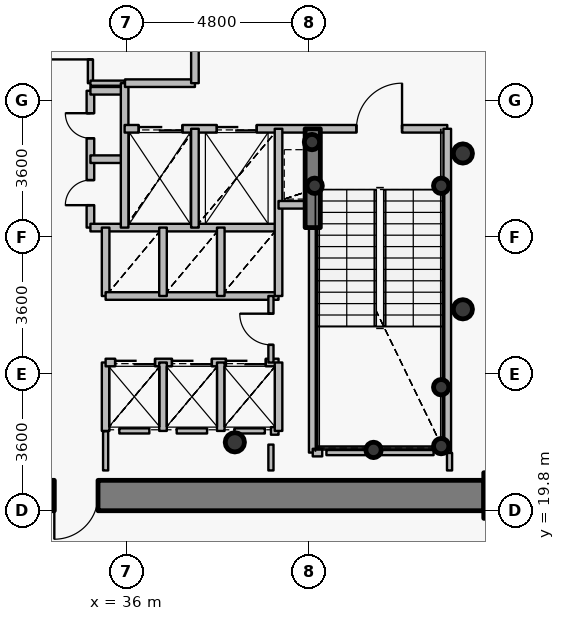
"""IFC4 building model, lengths in metres.
Left out: names, types, materials, properties, quantities, classifications, styles, units other than length and angle.
Written with IfcOpenShell. Run it as: python <this file> out.ifc"""

import sys

from ifc_helpers import new_model, si_unit, direction, frame, frame_2d, origin, origin_2d, place, context, subcontext, project, spatial, rectangle, hollow_circle, extrude, source, transform, mapped, element, fill, save


model = new_model("IFC4")
c1 = context("Model", 3, precision=1e-05, world=origin(), true_north=direction((0.0, 1.0)))
c2 = subcontext(c1, "Body", "Model", "MODEL_VIEW")
j1 = project(units=[si_unit("LENGTHUNIT", "METRE"), si_unit("PLANEANGLEUNIT", "RADIAN")], contexts=[c1])
p1 = place(None, origin())
s1 = spatial("IfcSite", under=j1, at=p1, CompositionType="ELEMENT")
p2 = place(p1, origin())
s2 = spatial("IfcBuilding", under=s1, at=p2, CompositionType="ELEMENT")
p3 = place(p2, frame((0.0, 0.0, 97.2)))
s3 = spatial("IfcBuildingStorey", under=s2, at=p3, CompositionType="ELEMENT", Elevation=97.2)
p4 = place(p3, frame((46.0, 20.2, 0.0), z_axis=(0.0, 0.0, 1.0), x_axis=(1.0, 0.0, 0.0)))
e1 = element("IfcColumn", 1, at=p4, inside=s3, PredefinedType="COLUMN", context=c2, shape_type="SweptSolid", body=[
    extrude(rectangle(XDim=1.2, YDim=1.2, at=origin_2d()), origin(), (0.0, 0.0, 1.0), 3.75),
])
p5 = place(p3, frame((38.85, 21.6, 0.0), z_axis=(0.0, 0.0, 1.0), x_axis=(1.0, 0.0, 0.0)))
e2 = element("IfcColumn", 2, at=p5, inside=s3, PredefinedType="COLUMN", context=c2, shape_type="SweptSolid", body=[
    extrude(hollow_circle(Radius=0.254, WallThickness=0.02, at=origin_2d()), origin(), (0.0, 0.0, 1.0), 3.75),
])
for number, where, z_axis, x_axis in (
    (3, (44.28, 21.5, 0.0), (0.0, 0.0, 1.0), (1.0, 0.0, 0.0)),
    (4, (44.28, 23.05, 0.0), (0.0, 0.0, 1.0), (1.0, 0.0, 0.0)),
    (5, (42.5, 21.4, 0.0), (0.0, 0.0, 1.0), (1.0, 0.0, 0.0)),
    (6, (40.95, 28.35, 0.0), (0.0, 0.0, 1.0), (1.0, 0.0, 0.0)),
    (7, (44.28, 28.35, 0.0), (0.0, 0.0, 1.0), (1.0, 0.0, 0.0)),
    (8, (40.88, 29.5, 0.0), (0.0, 0.0, 1.0), (1.0, 0.0, 0.0)),
):
    element("IfcColumn", number, at=place(p3, frame(where, z_axis=z_axis, x_axis=x_axis)), inside=s3, PredefinedType="COLUMN", context=c2, shape_type="SweptSolid", body=[
        extrude(hollow_circle(Radius=0.203, WallThickness=0.016, at=origin_2d()), origin(), (0.0, 0.0, 1.0), 3.75),
    ])
p6 = place(p3, frame((45.4, 20.2, 0.0), z_axis=(0.0, 0.0, 1.0), x_axis=(-1.0, 0.0, 0.0)))
e9 = element("IfcWall", 9, at=p6, inside=s3, PredefinedType="SHEAR", context=c2, shape_type="SweptSolid", body=[
    extrude(rectangle(XDim=18.8, YDim=0.8, at=frame_2d((9.4, 0.0))), origin(), (0.0, 0.0, 1.0), 2.95),
])
p7 = place(p6, frame((10.15, 0.0, 0.0)))
e10 = element("IfcOpeningElement", 10, at=p7, cuts=e9, PredefinedType="OPENING", context=c2, shape_type="SweptSolid", body=[
    extrude(rectangle(XDim=1.15, YDim=2.15, at=origin_2d()), frame((0.575, 0.41, 1.075), z_axis=(0.0, -1.0, 0.0), x_axis=(1.0, 0.0, 0.0)), (0.0, 0.0, 1.0), 0.82),
])
p8 = place(p3, frame((40.9, 27.25, 0.0), z_axis=(0.0, 0.0, 1.0), x_axis=(0.0, 1.0, 0.0)))
e11 = element("IfcWall", 11, at=p8, inside=s3, PredefinedType="SHEAR", context=c2, shape_type="SweptSolid", body=[
    extrude(rectangle(XDim=2.6, YDim=0.4, at=frame_2d((1.3, 0.0))), origin(), (0.0, 0.0, 1.0), 3.1),
])
for number, where, z_axis, x_axis in (
    (12, (44.85, 25.1, 0.0), (0.0, 0.0, 1.0), (1.0, 0.0, 0.0)),
    (13, (44.85, 29.2, 0.0), (0.0, 0.0, 1.0), (1.0, 0.0, 0.0)),
):
    element("IfcColumn", number, at=place(p3, frame(where, z_axis=z_axis, x_axis=x_axis)), inside=s3, PredefinedType="COLUMN", context=c2, shape_type="SweptSolid", body=[
        extrude(hollow_circle(Radius=0.254, WallThickness=0.02, at=origin_2d()), origin(), (0.0, 0.0, 1.0), 3.75),
    ])
p9 = place(p3, frame((35.05, 27.25, 0.0), z_axis=(0.0, 0.0, 1.0), x_axis=(0.0, 1.0, 0.0)))
e14 = element("IfcWall", 14, at=p9, inside=s3, PredefinedType="PARTITIONING", context=c2, shape_type="SweptSolid", body=[
    extrude(rectangle(XDim=3.6, YDim=0.2, at=frame_2d((1.8, 0.0))), origin(), (0.0, 0.0, 1.0), 3.5),
])
p10 = place(p9, frame((0.59, 0.0, 0.0)))
e15 = element("IfcOpeningElement", 15, at=p10, cuts=e14, PredefinedType="OPENING", context=c2, shape_type="SweptSolid", body=[
    extrude(rectangle(XDim=0.66, YDim=2.05, at=origin_2d()), frame((0.33, 0.11, 1.025), z_axis=(0.0, -1.0, 0.0), x_axis=(1.0, 0.0, 0.0)), (0.0, 0.0, 1.0), 0.22),
])
p11 = place(p9, frame((2.35, 0.0, 0.0)))
e16 = element("IfcOpeningElement", 16, at=p11, cuts=e14, PredefinedType="OPENING", context=c2, shape_type="SweptSolid", body=[
    extrude(rectangle(XDim=0.66, YDim=2.05, at=origin_2d()), frame((0.33, 0.11, 1.025), z_axis=(0.0, -1.0, 0.0), x_axis=(1.0, 0.0, 0.0)), (0.0, 0.0, 1.0), 0.22),
])
p12 = place(p3, frame((35.05, 27.25, 0.0), z_axis=(0.0, 0.0, 1.0), x_axis=(1.0, 0.0, 0.0)))
e17 = element("IfcWall", 17, at=p12, inside=s3, PredefinedType="PARTITIONING", context=c2, shape_type="SweptSolid", body=[
    extrude(rectangle(XDim=4.95, YDim=0.2, at=frame_2d((2.475, 0.0))), origin(), (0.0, 0.0, 1.0), 3.085),
])
for number, where, z_axis, x_axis in (
    (18, (35.05, 29.05, 0.0), (0.0, 0.0, 1.0), (1.0, 0.0, 0.0)),
    (19, (35.05, 30.85, 0.0), (0.0, 0.0, 1.0), (1.0, 0.0, 0.0)),
):
    element("IfcWall", number, at=place(p3, frame(where, z_axis=z_axis, x_axis=x_axis)), inside=s3, PredefinedType="PARTITIONING", context=c2, shape_type="SweptSolid", body=[
        extrude(rectangle(XDim=0.9, YDim=0.2, at=frame_2d((0.45, 0.0))), origin(), (0.0, 0.0, 1.0), 3.5),
    ])
p13 = place(p3, frame((35.05, 31.05, 0.0), z_axis=(0.0, 0.0, 1.0), x_axis=(0.0, 1.0, 0.0)))
e20 = element("IfcWall", 20, at=p13, inside=s3, PredefinedType="PARTITIONING", context=c2, shape_type="SweptSolid", body=[
    extrude(rectangle(XDim=2.35, YDim=0.135, at=frame_2d((1.175, 0.0))), origin(), (0.0, 0.0, 1.0), 3.085),
])
p14 = place(p13, frame((0.625, 0.0, 0.0)))
e21 = element("IfcOpeningElement", 21, at=p14, cuts=e20, PredefinedType="OPENING", context=c2, shape_type="SweptSolid", body=[
    extrude(rectangle(XDim=1.1, YDim=2.15, at=origin_2d()), frame((0.55, 0.078, 1.075), z_axis=(0.0, -1.0, 0.0), x_axis=(1.0, 0.0, 0.0)), (0.0, 0.0, 1.0), 0.155),
])
p15 = place(p3, frame((35.05, 31.05, 0.0), z_axis=(0.0, 0.0, 1.0), x_axis=(1.0, 0.0, 0.0)))
e22 = element("IfcWall", 22, at=p15, inside=s3, PredefinedType="PARTITIONING", context=c2, shape_type="SweptSolid", body=[
    extrude(rectangle(XDim=0.9, YDim=0.135, at=frame_2d((0.45, 0.0))), origin(), (0.0, 0.0, 1.0), 3.5),
])
p16 = place(p3, frame((35.45, 21.9, 0.0), z_axis=(0.0, 0.0, 1.0), x_axis=(0.0, 1.0, 0.0)))
e23 = element("IfcWall", 23, at=p16, inside=s3, PredefinedType="PARTITIONING", context=c2, shape_type="SweptSolid", body=[
    extrude(rectangle(XDim=1.8, YDim=0.2, at=frame_2d((0.9, 0.0))), origin(), (0.0, 0.0, 1.0), 3.5),
])
p17 = place(p3, frame((35.45, 23.7, 0.0), z_axis=(0.0, 0.0, 1.0), x_axis=(1.0, 0.0, 0.0)))
e24 = element("IfcWall", 24, at=p17, inside=s3, PredefinedType="PARTITIONING", context=c2, shape_type="SweptSolid", body=[
    extrude(rectangle(XDim=4.55, YDim=0.2, at=frame_2d((2.275, 0.0))), origin(), (0.0, 0.0, 1.0), 3.085),
])
p18 = place(p17, frame((0.25, 0.0, 0.0)))
e25 = element("IfcOpeningElement", 25, at=p18, cuts=e24, PredefinedType="OPENING", context=c2, shape_type="SweptSolid", body=[
    extrude(rectangle(XDim=1.05, YDim=2.15, at=origin_2d()), frame((0.525, 0.11, 1.075), z_axis=(0.0, -1.0, 0.0), x_axis=(1.0, 0.0, 0.0)), (0.0, 0.0, 1.0), 0.22),
])
p19 = place(p17, frame((1.745, 0.0, 0.0)))
e26 = element("IfcOpeningElement", 26, at=p19, cuts=e24, PredefinedType="OPENING", context=c2, shape_type="SweptSolid", body=[
    extrude(rectangle(XDim=1.05, YDim=2.15, at=origin_2d()), frame((0.525, 0.11, 1.075), z_axis=(0.0, -1.0, 0.0), x_axis=(1.0, 0.0, 0.0)), (0.0, 0.0, 1.0), 0.22),
])
p20 = place(p17, frame((3.165, 0.0, 0.0)))
e27 = element("IfcOpeningElement", 27, at=p20, cuts=e24, PredefinedType="OPENING", context=c2, shape_type="SweptSolid", body=[
    extrude(rectangle(XDim=1.05, YDim=2.15, at=origin_2d()), frame((0.525, 0.11, 1.075), z_axis=(0.0, -1.0, 0.0), x_axis=(1.0, 0.0, 0.0)), (0.0, 0.0, 1.0), 0.22),
])
p21 = place(p3, frame((35.45, 25.45, 0.0), z_axis=(0.0, 0.0, 1.0), x_axis=(0.0, 1.0, 0.0)))
e28 = element("IfcWall", 28, at=p21, inside=s3, PredefinedType="PARTITIONING", context=c2, shape_type="SweptSolid", body=[
    extrude(rectangle(XDim=1.8, YDim=0.2, at=frame_2d((0.9, 0.0))), origin(), (0.0, 0.0, 1.0), 3.5),
])
p22 = place(p3, frame((35.45, 25.45, 0.0), z_axis=(0.0, 0.0, 1.0), x_axis=(1.0, 0.0, 0.0)))
e29 = element("IfcWall", 29, at=p22, inside=s3, PredefinedType="PARTITIONING", context=c2, shape_type="SweptSolid", body=[
    extrude(rectangle(XDim=4.55, YDim=0.2, at=frame_2d((2.275, 0.0))), origin(), (0.0, 0.0, 1.0), 3.085),
])
p23 = place(p3, frame((35.95, 27.25, 0.0), z_axis=(0.0, 0.0, 1.0), x_axis=(0.0, 1.0, 0.0)))
e30 = element("IfcWall", 30, at=p23, inside=s3, PredefinedType="PARTITIONING", context=c2, shape_type="SweptSolid", body=[
    extrude(rectangle(XDim=3.8, YDim=0.2, at=frame_2d((1.9, 0.0))), origin(), (0.0, 0.0, 1.0), 3.5),
])
p24 = place(p3, frame((35.95, 29.85, 0.0), z_axis=(0.0, 0.0, 1.0), x_axis=(1.0, 0.0, 0.0)))
e31 = element("IfcWall", 31, at=p24, inside=s3, PredefinedType="PARTITIONING", context=c2, shape_type="SweptSolid", body=[
    extrude(rectangle(XDim=8.49, YDim=0.2, at=frame_2d((4.245, 0.0))), origin(), (0.0, 0.0, 1.0), 3.085),
])
p25 = place(p24, frame((6.1, 0.0, 0.0)))
e32 = element("IfcOpeningElement", 32, at=p25, cuts=e31, PredefinedType="OPENING", context=c2, shape_type="SweptSolid", body=[
    extrude(rectangle(XDim=1.2, YDim=2.15, at=origin_2d()), frame((0.6, 0.11, 1.075), z_axis=(0.0, -1.0, 0.0), x_axis=(1.0, 0.0, 0.0)), (0.0, 0.0, 1.0), 0.22),
])
p26 = place(p24, frame((0.37, 0.0, 0.0)))
e33 = element("IfcOpeningElement", 33, at=p26, cuts=e31, PredefinedType="OPENING", context=c2, shape_type="SweptSolid", body=[
    extrude(rectangle(XDim=1.15, YDim=2.15, at=origin_2d()), frame((0.575, 0.11, 1.075), z_axis=(0.0, -1.0, 0.0), x_axis=(1.0, 0.0, 0.0)), (0.0, 0.0, 1.0), 0.22),
])
p27 = place(p24, frame((2.425, 0.0, 0.0)))
e34 = element("IfcOpeningElement", 34, at=p27, cuts=e31, PredefinedType="OPENING", context=c2, shape_type="SweptSolid", body=[
    extrude(rectangle(XDim=1.05, YDim=2.15, at=origin_2d()), frame((0.525, 0.11, 1.075), z_axis=(0.0, -1.0, 0.0), x_axis=(1.0, 0.0, 0.0)), (0.0, 0.0, 1.0), 0.22),
])
p28 = place(p3, frame((35.96, 31.05, 0.0), z_axis=(0.0, 0.0, 1.0), x_axis=(1.0, 0.0, 0.0)))
e35 = element("IfcWall", 35, at=p28, inside=s3, PredefinedType="PARTITIONING", context=c2, shape_type="SweptSolid", body=[
    extrude(rectangle(XDim=1.84, YDim=0.2, at=frame_2d((0.92, 0.0))), origin(), (0.0, 0.0, 1.0), 3.5),
])
for number, where, z_axis, x_axis in (
    (36, (36.96, 21.9, 0.0), (0.0, 0.0, 1.0), (0.0, 1.0, 0.0)),
    (37, (36.96, 25.45, 0.0), (0.0, 0.0, 1.0), (0.0, 1.0, 0.0)),
):
    element("IfcWall", number, at=place(p3, frame(where, z_axis=z_axis, x_axis=x_axis)), inside=s3, PredefinedType="PARTITIONING", context=c2, shape_type="SweptSolid", body=[
        extrude(rectangle(XDim=1.8, YDim=0.2, at=frame_2d((0.9, 0.0))), origin(), (0.0, 0.0, 1.0), 3.5),
    ])
p29 = place(p3, frame((37.8, 27.25, 0.0), z_axis=(0.0, 0.0, 1.0), x_axis=(0.0, 1.0, 0.0)))
e38 = element("IfcWall", 38, at=p29, inside=s3, PredefinedType="PARTITIONING", context=c2, shape_type="SweptSolid", body=[
    extrude(rectangle(XDim=2.6, YDim=0.2, at=frame_2d((1.3, 0.0))), origin(), (0.0, 0.0, 1.0), 3.5),
])
p30 = place(p3, frame((37.8, 31.05, 0.0), z_axis=(0.0, 0.0, 1.0), x_axis=(0.0, 1.0, 0.0)))
e39 = element("IfcWall", 39, at=p30, inside=s3, PredefinedType="PARTITIONING", context=c2, shape_type="SweptSolid", body=[
    extrude(rectangle(XDim=2.35, YDim=0.2, at=frame_2d((1.175, 0.0))), origin(), (0.0, 0.0, 1.0), 3.085),
])
for number, where, z_axis, x_axis in (
    (40, (38.48, 21.9, 0.0), (0.0, 0.0, 1.0), (0.0, 1.0, 0.0)),
    (41, (38.48, 25.45, 0.0), (0.0, 0.0, 1.0), (0.0, 1.0, 0.0)),
):
    element("IfcWall", number, at=place(p3, frame(where, z_axis=z_axis, x_axis=x_axis)), inside=s3, PredefinedType="PARTITIONING", context=c2, shape_type="SweptSolid", body=[
        extrude(rectangle(XDim=1.8, YDim=0.2, at=frame_2d((0.9, 0.0))), origin(), (0.0, 0.0, 1.0), 3.5),
    ])
p31 = place(p3, frame((39.8, 21.9, 0.0), z_axis=(0.0, 0.0, 1.0), x_axis=(1.0, 0.0, 0.0)))
e42 = element("IfcWall", 42, at=p31, inside=s3, PredefinedType="PARTITIONING", context=c2, shape_type="SweptSolid", body=[
    extrude(rectangle(XDim=0.2, YDim=0.2, at=frame_2d((0.1, 0.0))), origin(), (0.0, 0.0, 1.0), 3.5),
])
p32 = place(p3, frame((39.8, 23.7, 0.0), z_axis=(0.0, 0.0, 1.0), x_axis=(0.0, 1.0, 0.0)))
e43 = element("IfcWall", 43, at=p32, inside=s3, PredefinedType="PARTITIONING", context=c2, shape_type="SweptSolid", body=[
    extrude(rectangle(XDim=1.75, YDim=0.135, at=frame_2d((0.875, 0.0))), origin(), (0.0, 0.0, 1.0), 3.5),
])
p33 = place(p32, frame((0.465, 0.0, 0.0)))
e44 = element("IfcOpeningElement", 44, at=p33, cuts=e43, PredefinedType="OPENING", context=c2, shape_type="SweptSolid", body=[
    extrude(rectangle(XDim=0.82, YDim=2.1, at=origin_2d()), frame((0.41, 0.078, 1.05), z_axis=(0.0, -1.0, 0.0), x_axis=(1.0, 0.0, 0.0)), (0.0, 0.0, 1.0), 0.155),
])
p34 = place(p3, frame((40.0, 21.9, 0.0), z_axis=(0.0, 0.0, 1.0), x_axis=(0.0, 1.0, 0.0)))
e45 = element("IfcWall", 45, at=p34, inside=s3, PredefinedType="PARTITIONING", context=c2, shape_type="SweptSolid", body=[
    extrude(rectangle(XDim=1.8, YDim=0.2, at=frame_2d((0.9, 0.0))), origin(), (0.0, 0.0, 1.0), 3.5),
])
p35 = place(p3, frame((40.0, 25.45, 0.0), z_axis=(0.0, 0.0, 1.0), x_axis=(0.0, 1.0, 0.0)))
e46 = element("IfcWall", 46, at=p35, inside=s3, PredefinedType="PARTITIONING", context=c2, shape_type="SweptSolid", body=[
    extrude(rectangle(XDim=4.4, YDim=0.2, at=frame_2d((2.2, 0.0))), origin(), (0.0, 0.0, 1.0), 3.5),
])
p36 = place(p3, frame((40.0, 27.85, 0.0), z_axis=(0.0, 0.0, 1.0), x_axis=(1.0, 0.0, 0.0)))
e47 = element("IfcWall", 47, at=p36, inside=s3, PredefinedType="PARTITIONING", context=c2, shape_type="SweptSolid", body=[
    extrude(rectangle(XDim=0.9, YDim=0.2, at=frame_2d((0.45, 0.0))), origin(), (0.0, 0.0, 1.0), 3.5),
])
p37 = place(p3, frame((40.9, 21.33, 0.0), z_axis=(0.0, 0.0, 1.0), x_axis=(0.0, 1.0, 0.0)))
e48 = element("IfcWall", 48, at=p37, inside=s3, PredefinedType="PARTITIONING", context=c2, shape_type="SweptSolid", body=[
    extrude(rectangle(XDim=5.91, YDim=0.2, at=frame_2d((2.955, 0.0))), origin(), (0.0, 0.0, 1.0), 3.035),
])
p38 = place(p3, frame((40.9, 21.33, 0.0), z_axis=(0.0, 0.0, 1.0), x_axis=(1.0, 0.0, 0.0)))
e49 = element("IfcWall", 49, at=p38, inside=s3, PredefinedType="PARTITIONING", context=c2, shape_type="SweptSolid", body=[
    extrude(rectangle(XDim=0.25, YDim=0.2, at=frame_2d((0.125, 0.0))), origin(), (0.0, 0.0, 1.0), 3.035),
])
p39 = place(p3, frame((44.44, 21.33, 0.0), z_axis=(0.0, 0.0, 1.0), x_axis=(0.0, 1.0, 0.0)))
e50 = element("IfcWall", 50, at=p39, inside=s3, PredefinedType="PARTITIONING", context=c2, shape_type="SweptSolid", body=[
    extrude(rectangle(XDim=8.52, YDim=0.2, at=frame_2d((4.26, 0.0))), origin(), (0.0, 0.0, 1.0), 3.5),
])
p40 = place(p3, frame((44.08, 21.33, 0.0), z_axis=(0.0, 0.0, 1.0), x_axis=(-1.0, 0.0, 0.0)))
e51 = element("IfcWall", 51, at=p40, inside=s3, PredefinedType="PARTITIONING", context=c2, shape_type="SweptSolid", body=[
    extrude(rectangle(XDim=2.82, YDim=0.135, at=frame_2d((1.41, 0.0))), origin(), (0.0, 0.0, 1.0), 3.035),
])
p41 = place(p3, frame((36.6, 21.9, 0.0), z_axis=(0.0, 0.0, 1.0), x_axis=(-1.0, 0.0, 0.0)))
e52 = element("IfcWall", 52, at=p41, inside=s3, PredefinedType="PARTITIONING", context=c2, shape_type="SweptSolid", body=[
    extrude(rectangle(XDim=0.79, YDim=0.135, at=frame_2d((0.395, 0.0))), origin(), (0.0, 0.0, 1.0), 3.5),
])
p42 = place(p3, frame((38.12, 21.9, 0.0), z_axis=(0.0, 0.0, 1.0), x_axis=(-1.0, 0.0, 0.0)))
e53 = element("IfcWall", 53, at=p42, inside=s3, PredefinedType="PARTITIONING", context=c2, shape_type="SweptSolid", body=[
    extrude(rectangle(XDim=0.8, YDim=0.135, at=frame_2d((0.4, 0.0))), origin(), (0.0, 0.0, 1.0), 3.5),
])
p43 = place(p3, frame((39.64, 21.9, 0.0), z_axis=(0.0, 0.0, 1.0), x_axis=(-1.0, 0.0, 0.0)))
e54 = element("IfcWall", 54, at=p43, inside=s3, PredefinedType="PARTITIONING", context=c2, shape_type="SweptSolid", body=[
    extrude(rectangle(XDim=0.8, YDim=0.135, at=frame_2d((0.4, 0.0))), origin(), (0.0, 0.0, 1.0), 3.085),
])
p44 = place(p3, frame((39.8, 20.86, 0.0), z_axis=(0.0, 0.0, 1.0), x_axis=(0.0, 1.0, 0.0)))
e55 = element("IfcWall", 55, at=p44, inside=s3, PredefinedType="PARTITIONING", context=c2, shape_type="SweptSolid", body=[
    extrude(rectangle(XDim=0.68, YDim=0.135, at=frame_2d((0.34, 0.0))), origin(), (0.0, 0.0, 1.0), 3.035),
])
p45 = place(p3, frame((44.5, 20.86, 0.0), z_axis=(0.0, 0.0, 1.0), x_axis=(0.0, 1.0, 0.0)))
e56 = element("IfcWall", 56, at=p45, inside=s3, PredefinedType="PARTITIONING", context=c2, shape_type="SweptSolid", body=[
    extrude(rectangle(XDim=0.46, YDim=0.135, at=frame_2d((0.23, 0.0))), origin(), (0.0, 0.0, 1.0), 3.5),
])
p46 = place(p3, frame((35.45, 21.89, 0.0), z_axis=(0.0, 0.0, 1.0), x_axis=(0.0, -1.0, 0.0)))
e57 = element("IfcWall", 57, at=p46, inside=s3, PredefinedType="PARTITIONING", context=c2, shape_type="SweptSolid", body=[
    extrude(rectangle(XDim=1.03, YDim=0.135, at=frame_2d((0.515, 0.0))), origin(), (0.0, 0.0, 1.0), 3.085),
])
p47 = place(p3, frame((45.41, 19.8, 0.0), z_axis=(0.0, 0.0, 1.0), x_axis=(1.0, 0.0, 0.0)))
e58 = element("IfcWall", 58, at=p47, inside=s3, PredefinedType="PARTITIONING", context=c2, shape_type="SweptSolid", body=[
    extrude(rectangle(XDim=0.99, YDim=0.135, at=frame_2d((0.495, 0.0))), origin(), (0.0, 0.0, 1.0), 2.935),
])
m1 = source(origin(), c2, "Body", "SweptSolid", [
    extrude(rectangle(XDim=1.15, YDim=2.15, at=origin_2d()), frame((0.575, 0.025, 1.075), z_axis=(0.0, -1.0, 0.0), x_axis=(1.0, 0.0, 0.0)), (0.0, 0.0, 1.0), 0.05),
])
p48 = place(p7, origin())
e59 = element("IfcDoor", 59, at=p48, inside=s3, OperationType="SINGLE_SWING_RIGHT", PredefinedType="DOOR", context=c2, shape_type="MappedRepresentation", body=[
    mapped(m1, transform((0.0, 0.0, 0.0), x_axis=(1.0, 0.0, 0.0), y_axis=(0.0, 1.0, 0.0), z_axis=(0.0, 0.0, 1.0), scale=1.0)),
])
fill(e10, e59)
m2 = source(origin(), c2, "Body", "SweptSolid", [
    extrude(rectangle(XDim=1.2, YDim=2.15, at=origin_2d()), frame((0.6, 0.025, 1.075), z_axis=(0.0, -1.0, 0.0), x_axis=(1.0, 0.0, 0.0)), (0.0, 0.0, 1.0), 0.05),
])
p49 = place(p25, origin())
e60 = element("IfcDoor", 60, at=p49, inside=s3, OperationType="SINGLE_SWING_RIGHT", PredefinedType="DOOR", context=c2, shape_type="MappedRepresentation", body=[
    mapped(m2, transform((0.0, 0.0, 0.0), x_axis=(1.0, 0.0, 0.0), y_axis=(0.0, 1.0, 0.0), z_axis=(0.0, 0.0, 1.0), scale=1.0)),
])
fill(e32, e60)
m3 = source(origin(), c2, "Body", "SweptSolid", [
    extrude(rectangle(XDim=1.15, YDim=2.15, at=origin_2d()), frame((0.575, 0.025, 1.075), z_axis=(0.0, -1.0, 0.0), x_axis=(1.0, 0.0, 0.0)), (0.0, 0.0, 1.0), 0.05),
])
p50 = place(p26, origin())
e61 = element("IfcDoor", 61, at=p50, inside=s3, OperationType="DOUBLE_DOOR_SLIDING", PredefinedType="USERDEFINED", context=c2, shape_type="MappedRepresentation", body=[
    mapped(m3, transform((0.0, 0.0, 0.0), x_axis=(1.0, 0.0, 0.0), y_axis=(0.0, 1.0, 0.0), z_axis=(0.0, 0.0, 1.0), scale=1.0)),
])
fill(e33, e61)
m4 = source(origin(), c2, "Body", "SweptSolid", [
    extrude(rectangle(XDim=1.05, YDim=2.15, at=origin_2d()), frame((0.525, 0.025, 1.075), z_axis=(0.0, -1.0, 0.0), x_axis=(1.0, 0.0, 0.0)), (0.0, 0.0, 1.0), 0.05),
])
p51 = place(p27, origin())
e62 = element("IfcDoor", 62, at=p51, inside=s3, OperationType="DOUBLE_DOOR_SLIDING", PredefinedType="USERDEFINED", context=c2, shape_type="MappedRepresentation", body=[
    mapped(m4, transform((0.0, 0.0, 0.0), x_axis=(1.0, 0.0, 0.0), y_axis=(0.0, 1.0, 0.0), z_axis=(0.0, 0.0, 1.0), scale=1.0)),
])
fill(e34, e62)
p52 = place(p18, origin())
e63 = element("IfcDoor", 63, at=p52, inside=s3, OperationType="DOUBLE_DOOR_SLIDING", PredefinedType="USERDEFINED", context=c2, shape_type="MappedRepresentation", body=[
    mapped(m4, transform((0.0, 0.0, 0.0), x_axis=(1.0, 0.0, 0.0), y_axis=(0.0, 1.0, 0.0), z_axis=(0.0, 0.0, 1.0), scale=1.0)),
])
fill(e25, e63)
p53 = place(p19, origin())
e64 = element("IfcDoor", 64, at=p53, inside=s3, OperationType="DOUBLE_DOOR_SLIDING", PredefinedType="USERDEFINED", context=c2, shape_type="MappedRepresentation", body=[
    mapped(m4, transform((0.0, 0.0, 0.0), x_axis=(1.0, 0.0, 0.0), y_axis=(0.0, 1.0, 0.0), z_axis=(0.0, 0.0, 1.0), scale=1.0)),
])
fill(e26, e64)
p54 = place(p20, origin())
e65 = element("IfcDoor", 65, at=p54, inside=s3, OperationType="DOUBLE_DOOR_SLIDING", PredefinedType="USERDEFINED", context=c2, shape_type="MappedRepresentation", body=[
    mapped(m4, transform((0.0, 0.0, 0.0), x_axis=(1.0, 0.0, 0.0), y_axis=(0.0, 1.0, 0.0), z_axis=(0.0, 0.0, 1.0), scale=1.0)),
])
fill(e27, e65)
m5 = source(origin(), c2, "Body", "SweptSolid", [
    extrude(rectangle(XDim=0.66, YDim=2.05, at=origin_2d()), frame((0.33, 0.025, 1.025), z_axis=(0.0, -1.0, 0.0), x_axis=(1.0, 0.0, 0.0)), (0.0, 0.0, 1.0), 0.05),
])
p55 = place(p10, origin())
e66 = element("IfcDoor", 66, at=p55, inside=s3, OperationType="SINGLE_SWING_LEFT", PredefinedType="USERDEFINED", context=c2, shape_type="MappedRepresentation", body=[
    mapped(m5, transform((0.0, 0.0, 0.0), x_axis=(1.0, 0.0, 0.0), y_axis=(0.0, 1.0, 0.0), z_axis=(0.0, 0.0, 1.0), scale=1.0)),
])
fill(e15, e66)
p56 = place(p11, origin())
e67 = element("IfcDoor", 67, at=p56, inside=s3, OperationType="SINGLE_SWING_RIGHT", PredefinedType="USERDEFINED", context=c2, shape_type="MappedRepresentation", body=[
    mapped(m5, transform((0.0, 0.0, 0.0), x_axis=(1.0, 0.0, 0.0), y_axis=(0.0, 1.0, 0.0), z_axis=(0.0, 0.0, 1.0), scale=1.0)),
])
fill(e16, e67)
m6 = source(origin(), c2, "Body", "SweptSolid", [
    extrude(rectangle(XDim=1.1, YDim=2.15, at=origin_2d()), frame((0.55, 0.025, 1.075), z_axis=(0.0, -1.0, 0.0), x_axis=(1.0, 0.0, 0.0)), (0.0, 0.0, 1.0), 0.05),
])
p57 = place(p14, origin())
e68 = element("IfcDoor", 68, at=p57, inside=s3, OperationType="SINGLE_SWING_LEFT", PredefinedType="DOOR", context=c2, shape_type="MappedRepresentation", body=[
    mapped(m6, transform((0.0, 0.0, 0.0), x_axis=(1.0, 0.0, 0.0), y_axis=(0.0, 1.0, 0.0), z_axis=(0.0, 0.0, 1.0), scale=1.0)),
])
fill(e21, e68)
m7 = source(origin(), c2, "Body", "SweptSolid", [
    extrude(rectangle(XDim=0.82, YDim=2.1, at=origin_2d()), frame((0.41, 0.025, 1.05), z_axis=(0.0, -1.0, 0.0), x_axis=(1.0, 0.0, 0.0)), (0.0, 0.0, 1.0), 0.05),
])
p58 = place(p33, origin())
e69 = element("IfcDoor", 69, at=p58, inside=s3, OperationType="SINGLE_SWING_RIGHT", PredefinedType="DOOR", context=c2, shape_type="MappedRepresentation", body=[
    mapped(m7, transform((0.0, 0.0, 0.0), x_axis=(1.0, 0.0, 0.0), y_axis=(0.0, 1.0, 0.0), z_axis=(0.0, 0.0, 1.0), scale=1.0)),
])
fill(e44, e69)
save(model, sys.argv[1])
